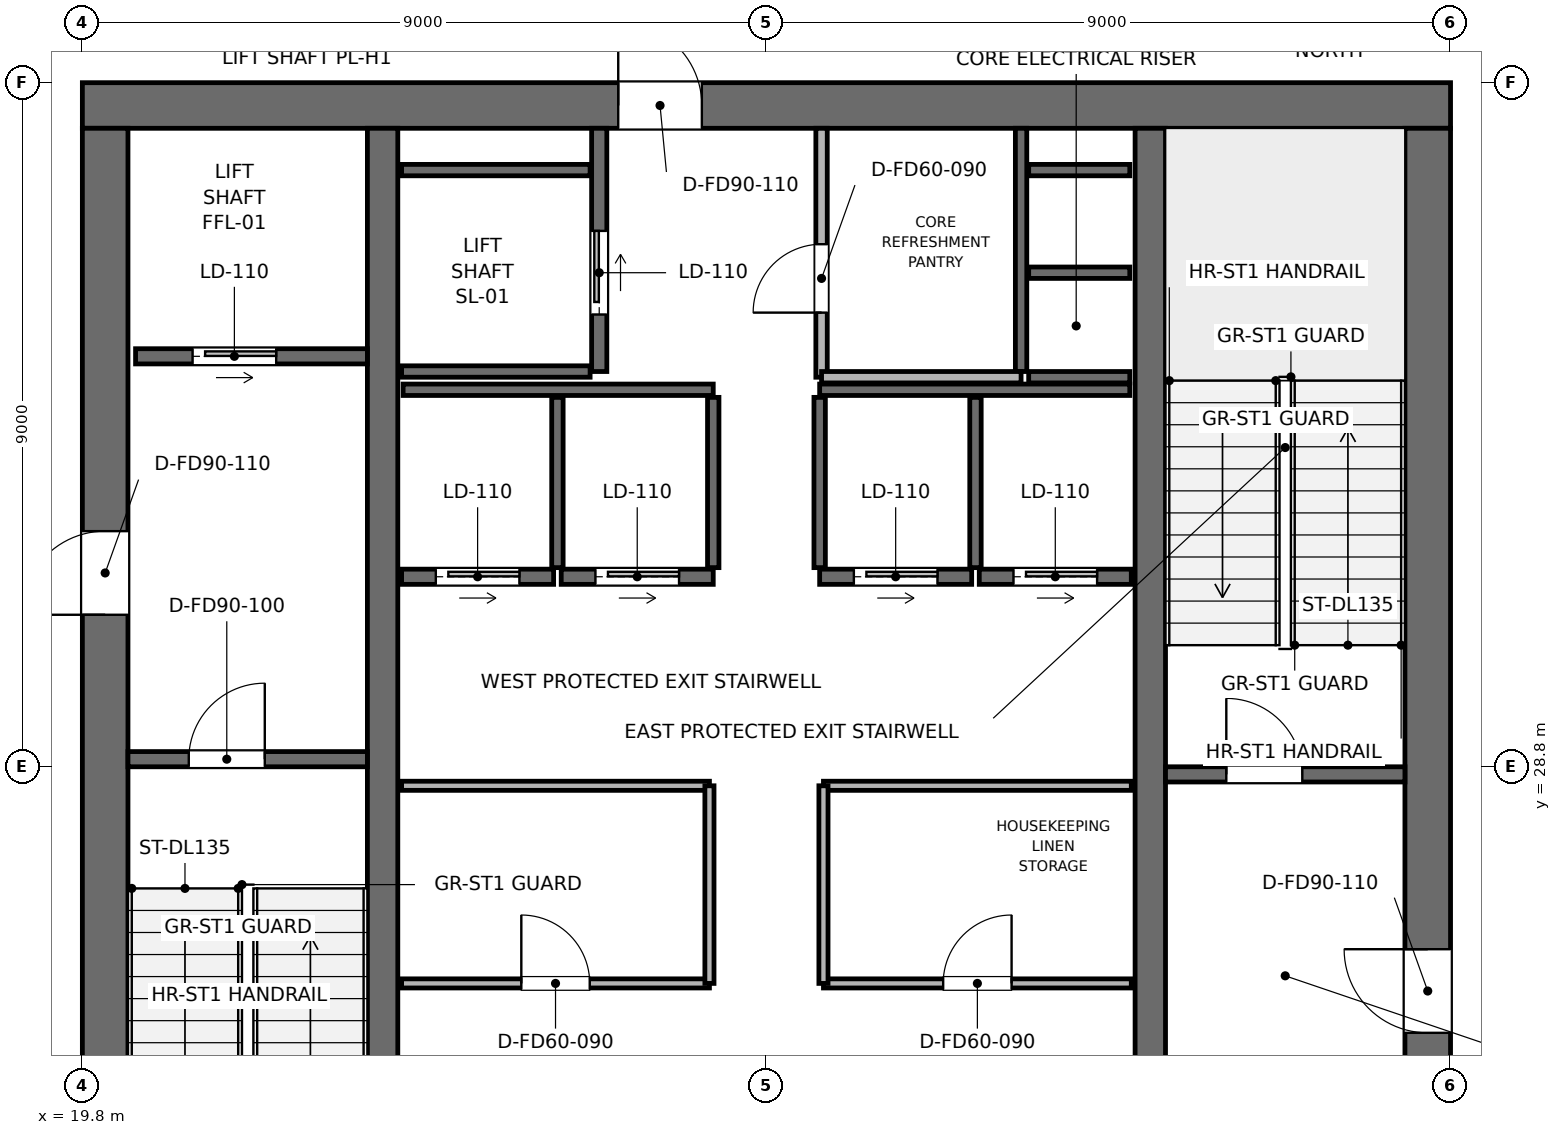
"""IFC4 building model, lengths in metres.
Left out: names, types, materials, properties, quantities, classifications, styles, units other than length and angle.
Written with IfcOpenShell. Run it as: python <this file> out.ifc"""

import sys

from ifc_helpers import new_model, si_unit, direction, frame, frame_2d, origin, place, context, subcontext, project, spatial, rectangle, extrude, element, fill, save


model = new_model("IFC4")
c1 = context("Model", 3, precision=1e-05, world=origin(), true_north=direction((0.0, 1.0)))
c2 = subcontext(c1, "Body", "Model", "MODEL_VIEW")
j1 = project(units=[si_unit("LENGTHUNIT", "METRE"), si_unit("PLANEANGLEUNIT", "RADIAN")], contexts=[c1])
p1 = place(None, origin())
s1 = spatial("IfcSite", under=j1, at=p1, CompositionType="ELEMENT")
p2 = place(p1, origin())
s2 = spatial("IfcBuilding", under=s1, at=p2, CompositionType="ELEMENT")
p3 = place(p2, frame((0.0, 0.0, 355.5)))
s3 = spatial("IfcBuildingStorey", under=s2, at=p3, CompositionType="ELEMENT", Elevation=355.5)
p4 = place(p3, frame((19.8, 37.5, 0.0), z_axis=(0.0, 0.0, 1.0), x_axis=(1.0, 0.0, 0.0)))
e1 = element("IfcWall", 1, at=p4, inside=s3, PredefinedType="SHEAR", context=c2, shape_type="SweptSolid", body=[
    extrude(rectangle(XDim=18.0, YDim=0.6, at=frame_2d((9.0, 0.0))), origin(), (0.0, 0.0, 1.0), 4.5),
])
p5 = place(p4, frame((7.05, 0.0, 0.0)))
e2 = element("IfcOpeningElement", 2, at=p5, cuts=e1, PredefinedType="OPENING", context=c2, shape_type="SweptSolid", body=[
    extrude(rectangle(XDim=1.1, YDim=2.15, at=frame_2d((0.55, 1.075))), frame((0.0, 0.31, 0.0), z_axis=(0.0, -1.0, 0.0), x_axis=(1.0, 0.0, 0.0)), (0.0, 0.0, 1.0), 0.62),
])
p6 = place(p3, frame((20.1, 20.4, 0.0), z_axis=(0.0, 0.0, 1.0), x_axis=(0.0, 1.0, 0.0)))
e3 = element("IfcWall", 3, at=p6, inside=s3, PredefinedType="SHEAR", context=c2, shape_type="SweptSolid", body=[
    extrude(rectangle(XDim=16.8, YDim=0.6, at=frame_2d((8.4, 0.0))), origin(), (0.0, 0.0, 1.0), 4.5),
])
p7 = place(p6, frame((10.4, 0.0, 0.0)))
e4 = element("IfcOpeningElement", 4, at=p7, cuts=e3, PredefinedType="OPENING", context=c2, shape_type="SweptSolid", body=[
    extrude(rectangle(XDim=1.1, YDim=2.15, at=frame_2d((0.55, 1.075))), frame((0.0, 0.31, 0.0), z_axis=(0.0, -1.0, 0.0), x_axis=(1.0, 0.0, 0.0)), (0.0, 0.0, 1.0), 0.62),
])
p8 = place(p3, frame((37.5, 20.4, 0.0), z_axis=(0.0, 0.0, 1.0), x_axis=(0.0, 1.0, 0.0)))
e5 = element("IfcWall", 5, at=p8, inside=s3, PredefinedType="SHEAR", context=c2, shape_type="SweptSolid", body=[
    extrude(rectangle(XDim=16.8, YDim=0.6, at=frame_2d((8.4, 0.0))), origin(), (0.0, 0.0, 1.0), 4.5),
])
p9 = place(p8, frame((4.9, 0.0, 0.0)))
e6 = element("IfcOpeningElement", 6, at=p9, cuts=e5, PredefinedType="OPENING", context=c2, shape_type="SweptSolid", body=[
    extrude(rectangle(XDim=1.1, YDim=2.15, at=frame_2d((0.55, 1.075))), frame((0.0, 0.31, 0.0), z_axis=(0.0, -1.0, 0.0), x_axis=(1.0, 0.0, 0.0)), (0.0, 0.0, 1.0), 0.62),
])
for number, where, z_axis, x_axis in (
    (7, (23.75, 20.4, 0.0), (0.0, 0.0, 1.0), (0.0, 1.0, 0.0)),
    (8, (33.85, 20.4, 0.0), (0.0, 0.0, 1.0), (0.0, 1.0, 0.0)),
):
    element("IfcWall", number, at=place(p3, frame(where, z_axis=z_axis, x_axis=x_axis)), inside=s3, PredefinedType="SHEAR", context=c2, shape_type="SweptSolid", body=[
        extrude(rectangle(XDim=16.8, YDim=0.4, at=frame_2d((8.4, 0.0))), origin(), (0.0, 0.0, 1.0), 4.5),
    ])
p10 = place(p3, frame((20.4, 28.9, 0.0), z_axis=(0.0, 0.0, 1.0), x_axis=(1.0, 0.0, 0.0)))
e9 = element("IfcWall", 9, at=p10, inside=s3, PredefinedType="SHEAR", context=c2, shape_type="SweptSolid", body=[
    extrude(rectangle(XDim=3.15, YDim=0.2, at=frame_2d((1.575, 0.0))), origin(), (0.0, 0.0, 1.0), 4.24),
])
p11 = place(p10, frame((0.8, 0.0, 0.0)))
e10 = element("IfcOpeningElement", 10, at=p11, cuts=e9, PredefinedType="OPENING", context=c2, shape_type="SweptSolid", body=[
    extrude(rectangle(XDim=1.0, YDim=2.1, at=frame_2d((0.5, 1.05))), frame((0.0, 0.11, 0.0), z_axis=(0.0, -1.0, 0.0), x_axis=(1.0, 0.0, 0.0)), (0.0, 0.0, 1.0), 0.22),
])
p12 = place(p3, frame((34.05, 28.7, 0.0), z_axis=(0.0, 0.0, 1.0), x_axis=(1.0, 0.0, 0.0)))
e11 = element("IfcWall", 11, at=p12, inside=s3, PredefinedType="SHEAR", context=c2, shape_type="SweptSolid", body=[
    extrude(rectangle(XDim=3.15, YDim=0.2, at=frame_2d((1.575, 0.0))), origin(), (0.0, 0.0, 1.0), 4.24),
])
p13 = place(p12, frame((0.8, 0.0, 0.0)))
e12 = element("IfcOpeningElement", 12, at=p13, cuts=e11, PredefinedType="OPENING", context=c2, shape_type="SweptSolid", body=[
    extrude(rectangle(XDim=1.0, YDim=2.1, at=frame_2d((0.5, 1.05))), frame((0.0, 0.11, 0.0), z_axis=(0.0, -1.0, 0.0), x_axis=(1.0, 0.0, 0.0)), (0.0, 0.0, 1.0), 0.22),
])
p14 = place(p3, frame((32.15, 34.0, 0.0), z_axis=(0.0, 0.0, 1.0), x_axis=(0.0, 1.0, 0.0)))
e13 = element("IfcWall", 13, at=p14, inside=s3, PredefinedType="SHEAR", context=c2, shape_type="SweptSolid", body=[
    extrude(rectangle(XDim=3.2, YDim=0.15, at=frame_2d((1.6, 0.0))), origin(), (0.0, 0.0, 1.0), 4.24),
])
for number, where, z_axis, x_axis in (
    (14, (32.25, 33.925, 0.0), (0.0, 0.0, 1.0), (1.0, 0.0, 0.0)),
    (15, (32.25, 35.3, 0.0), (0.0, 0.0, 1.0), (1.0, 0.0, 0.0)),
):
    element("IfcWall", number, at=place(p3, frame(where, z_axis=z_axis, x_axis=x_axis)), inside=s3, PredefinedType="SHEAR", context=c2, shape_type="SweptSolid", body=[
        extrude(rectangle(XDim=1.33, YDim=0.15, at=frame_2d((0.665, 0.0))), origin(), (0.0, 0.0, 1.0), 4.24),
    ])
p15 = place(p3, frame((20.5, 34.2, 0.0), z_axis=(0.0, 0.0, 1.0), x_axis=(1.0, 0.0, 0.0)))
e16 = element("IfcWall", 16, at=p15, inside=s3, PredefinedType="SHEAR", context=c2, shape_type="SweptSolid", body=[
    extrude(rectangle(XDim=3.05, YDim=0.2, at=frame_2d((1.525, 0.0))), origin(), (0.0, 0.0, 1.0), 4.24),
])
p16 = place(p15, frame((0.75, 0.0, 0.0)))
e17 = element("IfcOpeningElement", 17, at=p16, cuts=e16, PredefinedType="OPENING", context=c2, shape_type="SweptSolid", body=[
    extrude(rectangle(XDim=1.1, YDim=2.15, at=frame_2d((0.55, 1.075))), frame((0.0, 0.11, 0.0), z_axis=(0.0, -1.0, 0.0), x_axis=(1.0, 0.0, 0.0)), (0.0, 0.0, 1.0), 0.22),
])
p17 = place(p3, frame((26.6, 34.0, 0.0), z_axis=(0.0, 0.0, 1.0), x_axis=(0.0, 1.0, 0.0)))
e18 = element("IfcWall", 18, at=p17, inside=s3, PredefinedType="SHEAR", context=c2, shape_type="SweptSolid", body=[
    extrude(rectangle(XDim=3.2, YDim=0.2, at=frame_2d((1.6, 0.0))), origin(), (0.0, 0.0, 1.0), 4.24),
])
p18 = place(p17, frame((0.75, 0.0, 0.0)))
e19 = element("IfcOpeningElement", 19, at=p18, cuts=e18, PredefinedType="OPENING", context=c2, shape_type="SweptSolid", body=[
    extrude(rectangle(XDim=1.1, YDim=2.15, at=frame_2d((0.55, 1.075))), frame((0.0, 0.11, 0.0), z_axis=(0.0, -1.0, 0.0), x_axis=(1.0, 0.0, 0.0)), (0.0, 0.0, 1.0), 0.22),
])
for number, where, z_axis, x_axis in (
    (20, (24.0, 34.0, 0.0), (0.0, 0.0, 1.0), (1.0, 0.0, 0.0)),
    (21, (24.0, 36.65, 0.0), (0.0, 0.0, 1.0), (1.0, 0.0, 0.0)),
):
    element("IfcWall", number, at=place(p3, frame(where, z_axis=z_axis, x_axis=x_axis)), inside=s3, PredefinedType="SHEAR", context=c2, shape_type="SweptSolid", body=[
        extrude(rectangle(XDim=2.48, YDim=0.15, at=frame_2d((1.24, 0.0))), origin(), (0.0, 0.0, 1.0), 4.24),
    ])
p19 = place(p3, frame((24.0, 31.3, 0.0), z_axis=(0.0, 0.0, 1.0), x_axis=(1.0, 0.0, 0.0)))
e22 = element("IfcWall", 22, at=p19, inside=s3, PredefinedType="SHEAR", context=c2, shape_type="SweptSolid", body=[
    extrude(rectangle(XDim=2.0, YDim=0.2, at=frame_2d((1.0, 0.0))), origin(), (0.0, 0.0, 1.0), 4.24),
])
p20 = place(p19, frame((0.45, 0.0, 0.0)))
e23 = element("IfcOpeningElement", 23, at=p20, cuts=e22, PredefinedType="OPENING", context=c2, shape_type="SweptSolid", body=[
    extrude(rectangle(XDim=1.1, YDim=2.15, at=frame_2d((0.55, 1.075))), frame((0.0, 0.11, 0.0), z_axis=(0.0, -1.0, 0.0), x_axis=(1.0, 0.0, 0.0)), (0.0, 0.0, 1.0), 0.22),
])
p21 = place(p3, frame((26.1, 31.3, 0.0), z_axis=(0.0, 0.0, 1.0), x_axis=(1.0, 0.0, 0.0)))
e24 = element("IfcWall", 24, at=p21, inside=s3, PredefinedType="SHEAR", context=c2, shape_type="SweptSolid", body=[
    extrude(rectangle(XDim=2.0, YDim=0.2, at=frame_2d((1.0, 0.0))), origin(), (0.0, 0.0, 1.0), 4.24),
])
p22 = place(p21, frame((0.45, 0.0, 0.0)))
e25 = element("IfcOpeningElement", 25, at=p22, cuts=e24, PredefinedType="OPENING", context=c2, shape_type="SweptSolid", body=[
    extrude(rectangle(XDim=1.1, YDim=2.15, at=frame_2d((0.55, 1.075))), frame((0.0, 0.11, 0.0), z_axis=(0.0, -1.0, 0.0), x_axis=(1.0, 0.0, 0.0)), (0.0, 0.0, 1.0), 0.22),
])
p23 = place(p3, frame((29.5, 31.3, 0.0), z_axis=(0.0, 0.0, 1.0), x_axis=(1.0, 0.0, 0.0)))
e26 = element("IfcWall", 26, at=p23, inside=s3, PredefinedType="SHEAR", context=c2, shape_type="SweptSolid", body=[
    extrude(rectangle(XDim=2.0, YDim=0.2, at=frame_2d((1.0, 0.0))), origin(), (0.0, 0.0, 1.0), 4.24),
])
p24 = place(p23, frame((0.45, 0.0, 0.0)))
e27 = element("IfcOpeningElement", 27, at=p24, cuts=e26, PredefinedType="OPENING", context=c2, shape_type="SweptSolid", body=[
    extrude(rectangle(XDim=1.1, YDim=2.15, at=frame_2d((0.55, 1.075))), frame((0.0, 0.11, 0.0), z_axis=(0.0, -1.0, 0.0), x_axis=(1.0, 0.0, 0.0)), (0.0, 0.0, 1.0), 0.22),
])
p25 = place(p3, frame((31.6, 31.3, 0.0), z_axis=(0.0, 0.0, 1.0), x_axis=(1.0, 0.0, 0.0)))
e28 = element("IfcWall", 28, at=p25, inside=s3, PredefinedType="SHEAR", context=c2, shape_type="SweptSolid", body=[
    extrude(rectangle(XDim=2.0, YDim=0.2, at=frame_2d((1.0, 0.0))), origin(), (0.0, 0.0, 1.0), 4.24),
])
p26 = place(p25, frame((0.45, 0.0, 0.0)))
e29 = element("IfcOpeningElement", 29, at=p26, cuts=e28, PredefinedType="OPENING", context=c2, shape_type="SweptSolid", body=[
    extrude(rectangle(XDim=1.1, YDim=2.15, at=frame_2d((0.55, 1.075))), frame((0.0, 0.11, 0.0), z_axis=(0.0, -1.0, 0.0), x_axis=(1.0, 0.0, 0.0)), (0.0, 0.0, 1.0), 0.22),
])
p27 = place(p3, frame((32.25, 36.65, 0.0), z_axis=(0.0, 0.0, 1.0), x_axis=(1.0, 0.0, 0.0)))
e30 = element("IfcWall", 30, at=p27, inside=s3, PredefinedType="SHEAR", context=c2, shape_type="SweptSolid", body=[
    extrude(rectangle(XDim=1.33, YDim=0.15, at=frame_2d((0.665, 0.0))), origin(), (0.0, 0.0, 1.0), 4.24),
])
for number, where, z_axis, x_axis in (
    (31, (24.02, 33.76, 0.0), (0.0, 0.0, 1.0), (1.0, 0.0, 0.0)),
    (32, (29.5, 33.76, 0.0), (0.0, 0.0, 1.0), (1.0, 0.0, 0.0)),
):
    element("IfcWall", number, at=place(p3, frame(where, z_axis=z_axis, x_axis=x_axis)), inside=s3, PredefinedType="SHEAR", context=c2, shape_type="SweptSolid", body=[
        extrude(rectangle(XDim=4.08, YDim=0.15, at=frame_2d((2.04, 0.0))), origin(), (0.0, 0.0, 1.0), 4.24),
    ])
for number, where, z_axis, x_axis in (
    (33, (26.05, 31.42, 0.0), (0.0, 0.0, 1.0), (0.0, 1.0, 0.0)),
    (34, (28.1, 31.42, 0.0), (0.0, 0.0, 1.0), (0.0, 1.0, 0.0)),
    (35, (29.5, 31.42, 0.0), (0.0, 0.0, 1.0), (0.0, 1.0, 0.0)),
    (36, (31.55, 31.42, 0.0), (0.0, 0.0, 1.0), (0.0, 1.0, 0.0)),
):
    element("IfcWall", number, at=place(p3, frame(where, z_axis=z_axis, x_axis=x_axis)), inside=s3, PredefinedType="SHEAR", context=c2, shape_type="SweptSolid", body=[
        extrude(rectangle(XDim=2.24, YDim=0.15, at=frame_2d((1.12, 0.0))), origin(), (0.0, 0.0, 1.0), 4.24),
    ])
p28 = place(p3, frame((29.525, 33.925, 0.0), z_axis=(0.0, 0.0, 1.0), x_axis=(0.0, 1.0, 0.0)))
e37 = element("IfcWall", 37, at=p28, inside=s3, PredefinedType="PARTITIONING", context=c2, shape_type="SweptSolid", body=[
    extrude(rectangle(XDim=3.275, YDim=0.15, at=frame_2d((1.637, 0.0))), origin(), (0.0, 0.0, 1.0), 4.24),
])
p29 = place(p28, frame((0.85, 0.0, 0.0)))
e38 = element("IfcOpeningElement", 38, at=p29, cuts=e37, PredefinedType="OPENING", context=c2, shape_type="SweptSolid", body=[
    extrude(rectangle(XDim=0.9, YDim=2.1, at=frame_2d((0.45, 1.05))), frame((0.0, 0.085, 0.0), z_axis=(0.0, -1.0, 0.0), x_axis=(1.0, 0.0, 0.0)), (0.0, 0.0, 1.0), 0.17),
])
p30 = place(p3, frame((29.525, 33.925, 0.0), z_axis=(0.0, 0.0, 1.0), x_axis=(1.0, 0.0, 0.0)))
e39 = element("IfcWall", 39, at=p30, inside=s3, PredefinedType="PARTITIONING", context=c2, shape_type="SweptSolid", body=[
    extrude(rectangle(XDim=2.625, YDim=0.15, at=frame_2d((1.312, 0.0))), origin(), (0.0, 0.0, 1.0), 4.24),
])
p31 = place(p3, frame((24.0, 25.95, 0.0), z_axis=(0.0, 0.0, 1.0), x_axis=(1.0, 0.0, 0.0)))
e40 = element("IfcWall", 40, at=p31, inside=s3, PredefinedType="PARTITIONING", context=c2, shape_type="SweptSolid", body=[
    extrude(rectangle(XDim=4.05, YDim=0.12, at=frame_2d((2.025, 0.0))), origin(), (0.0, 0.0, 1.0), 4.24),
])
p32 = place(p31, frame((1.575, 0.0, 0.0)))
e41 = element("IfcOpeningElement", 41, at=p32, cuts=e40, PredefinedType="OPENING", context=c2, shape_type="SweptSolid", body=[
    extrude(rectangle(XDim=0.9, YDim=2.1, at=frame_2d((0.45, 1.05))), frame((0.0, 0.07, 0.0), z_axis=(0.0, -1.0, 0.0), x_axis=(1.0, 0.0, 0.0)), (0.0, 0.0, 1.0), 0.14),
])
p33 = place(p3, frame((24.0, 28.55, 0.0), z_axis=(0.0, 0.0, 1.0), x_axis=(1.0, 0.0, 0.0)))
e42 = element("IfcWall", 42, at=p33, inside=s3, PredefinedType="PARTITIONING", context=c2, shape_type="SweptSolid", body=[
    extrude(rectangle(XDim=4.05, YDim=0.12, at=frame_2d((2.025, 0.0))), origin(), (0.0, 0.0, 1.0), 4.24),
])
p34 = place(p3, frame((28.05, 25.95, 0.0), z_axis=(0.0, 0.0, 1.0), x_axis=(0.0, 1.0, 0.0)))
e43 = element("IfcWall", 43, at=p34, inside=s3, PredefinedType="PARTITIONING", context=c2, shape_type="SweptSolid", body=[
    extrude(rectangle(XDim=2.6, YDim=0.12, at=frame_2d((1.3, 0.0))), origin(), (0.0, 0.0, 1.0), 4.24),
])
p35 = place(p3, frame((29.55, 25.95, 0.0), z_axis=(0.0, 0.0, 1.0), x_axis=(1.0, 0.0, 0.0)))
e44 = element("IfcWall", 44, at=p35, inside=s3, PredefinedType="PARTITIONING", context=c2, shape_type="SweptSolid", body=[
    extrude(rectangle(XDim=4.05, YDim=0.12, at=frame_2d((2.025, 0.0))), origin(), (0.0, 0.0, 1.0), 4.24),
])
p36 = place(p35, frame((1.575, 0.0, 0.0)))
e45 = element("IfcOpeningElement", 45, at=p36, cuts=e44, PredefinedType="OPENING", context=c2, shape_type="SweptSolid", body=[
    extrude(rectangle(XDim=0.9, YDim=2.1, at=frame_2d((0.45, 1.05))), frame((0.0, 0.07, 0.0), z_axis=(0.0, -1.0, 0.0), x_axis=(1.0, 0.0, 0.0)), (0.0, 0.0, 1.0), 0.14),
])
p37 = place(p3, frame((29.55, 28.55, 0.0), z_axis=(0.0, 0.0, 1.0), x_axis=(1.0, 0.0, 0.0)))
e46 = element("IfcWall", 46, at=p37, inside=s3, PredefinedType="PARTITIONING", context=c2, shape_type="SweptSolid", body=[
    extrude(rectangle(XDim=4.05, YDim=0.12, at=frame_2d((2.025, 0.0))), origin(), (0.0, 0.0, 1.0), 4.24),
])
p38 = place(p3, frame((29.55, 25.95, 0.0), z_axis=(0.0, 0.0, 1.0), x_axis=(0.0, 1.0, 0.0)))
e47 = element("IfcWall", 47, at=p38, inside=s3, PredefinedType="PARTITIONING", context=c2, shape_type="SweptSolid", body=[
    extrude(rectangle(XDim=2.6, YDim=0.12, at=frame_2d((1.3, 0.0))), origin(), (0.0, 0.0, 1.0), 4.24),
])
p39 = place(p11, origin())
e48 = element("IfcDoor", 48, at=p39, inside=s3, OperationType="SINGLE_SWING_RIGHT", PredefinedType="DOOR", context=c2, shape_type="SweptSolid", body=[
    extrude(rectangle(XDim=1.0, YDim=2.1, at=frame_2d((0.5, 1.05))), frame((0.0, 0.025, 0.0), z_axis=(0.0, -1.0, 0.0), x_axis=(1.0, 0.0, 0.0)), (0.0, 0.0, 1.0), 0.05),
])
fill(e10, e48)
p40 = place(p13, origin())
e49 = element("IfcDoor", 49, at=p40, inside=s3, OperationType="SINGLE_SWING_LEFT", PredefinedType="DOOR", context=c2, shape_type="SweptSolid", body=[
    extrude(rectangle(XDim=1.0, YDim=2.1, at=frame_2d((0.5, 1.05))), frame((0.0, 0.025, 0.0), z_axis=(0.0, -1.0, 0.0), x_axis=(1.0, 0.0, 0.0)), (0.0, 0.0, 1.0), 0.05),
])
fill(e12, e49)
p41 = place(p16, origin())
e50 = element("IfcDoor", 50, at=p41, inside=s3, OperationType="SLIDING_TO_RIGHT", PredefinedType="DOOR", context=c2, shape_type="SweptSolid", body=[
    extrude(rectangle(XDim=1.1, YDim=2.15, at=frame_2d((0.55, 1.075))), frame((0.0, 0.025, 0.0), z_axis=(0.0, -1.0, 0.0), x_axis=(1.0, 0.0, 0.0)), (0.0, 0.0, 1.0), 0.05),
])
fill(e17, e50)
p42 = place(p18, origin())
e51 = element("IfcDoor", 51, at=p42, inside=s3, OperationType="SLIDING_TO_RIGHT", PredefinedType="DOOR", context=c2, shape_type="SweptSolid", body=[
    extrude(rectangle(XDim=1.1, YDim=2.15, at=frame_2d((0.55, 1.075))), frame((0.0, 0.025, 0.0), z_axis=(0.0, -1.0, 0.0), x_axis=(1.0, 0.0, 0.0)), (0.0, 0.0, 1.0), 0.05),
])
fill(e19, e51)
p43 = place(p20, origin())
e52 = element("IfcDoor", 52, at=p43, inside=s3, OperationType="SLIDING_TO_RIGHT", PredefinedType="DOOR", context=c2, shape_type="SweptSolid", body=[
    extrude(rectangle(XDim=1.1, YDim=2.15, at=frame_2d((0.55, 1.075))), frame((0.0, 0.025, 0.0), z_axis=(0.0, -1.0, 0.0), x_axis=(1.0, 0.0, 0.0)), (0.0, 0.0, 1.0), 0.05),
])
fill(e23, e52)
p44 = place(p22, origin())
e53 = element("IfcDoor", 53, at=p44, inside=s3, OperationType="SLIDING_TO_RIGHT", PredefinedType="DOOR", context=c2, shape_type="SweptSolid", body=[
    extrude(rectangle(XDim=1.1, YDim=2.15, at=frame_2d((0.55, 1.075))), frame((0.0, 0.025, 0.0), z_axis=(0.0, -1.0, 0.0), x_axis=(1.0, 0.0, 0.0)), (0.0, 0.0, 1.0), 0.05),
])
fill(e25, e53)
p45 = place(p24, origin())
e54 = element("IfcDoor", 54, at=p45, inside=s3, OperationType="SLIDING_TO_RIGHT", PredefinedType="DOOR", context=c2, shape_type="SweptSolid", body=[
    extrude(rectangle(XDim=1.1, YDim=2.15, at=frame_2d((0.55, 1.075))), frame((0.0, 0.025, 0.0), z_axis=(0.0, -1.0, 0.0), x_axis=(1.0, 0.0, 0.0)), (0.0, 0.0, 1.0), 0.05),
])
fill(e27, e54)
p46 = place(p26, origin())
e55 = element("IfcDoor", 55, at=p46, inside=s3, OperationType="SLIDING_TO_RIGHT", PredefinedType="DOOR", context=c2, shape_type="SweptSolid", body=[
    extrude(rectangle(XDim=1.1, YDim=2.15, at=frame_2d((0.55, 1.075))), frame((0.0, 0.025, 0.0), z_axis=(0.0, -1.0, 0.0), x_axis=(1.0, 0.0, 0.0)), (0.0, 0.0, 1.0), 0.05),
])
fill(e29, e55)
p47 = place(p29, origin())
e56 = element("IfcDoor", 56, at=p47, inside=s3, OperationType="SINGLE_SWING_LEFT", PredefinedType="DOOR", context=c2, shape_type="SweptSolid", body=[
    extrude(rectangle(XDim=0.9, YDim=2.1, at=frame_2d((0.45, 1.05))), frame((0.0, 0.025, 0.0), z_axis=(0.0, -1.0, 0.0), x_axis=(1.0, 0.0, 0.0)), (0.0, 0.0, 1.0), 0.05),
])
fill(e38, e56)
p48 = place(p32, origin())
e57 = element("IfcDoor", 57, at=p48, inside=s3, OperationType="SINGLE_SWING_LEFT", PredefinedType="DOOR", context=c2, shape_type="SweptSolid", body=[
    extrude(rectangle(XDim=0.9, YDim=2.1, at=frame_2d((0.45, 1.05))), frame((0.0, 0.025, 0.0), z_axis=(0.0, -1.0, 0.0), x_axis=(1.0, 0.0, 0.0)), (0.0, 0.0, 1.0), 0.05),
])
fill(e41, e57)
p49 = place(p36, origin())
e58 = element("IfcDoor", 58, at=p49, inside=s3, OperationType="SINGLE_SWING_RIGHT", PredefinedType="DOOR", context=c2, shape_type="SweptSolid", body=[
    extrude(rectangle(XDim=0.9, YDim=2.1, at=frame_2d((0.45, 1.05))), frame((0.0, 0.025, 0.0), z_axis=(0.0, -1.0, 0.0), x_axis=(1.0, 0.0, 0.0)), (0.0, 0.0, 1.0), 0.05),
])
fill(e45, e58)
p50 = place(p7, origin())
e59 = element("IfcDoor", 59, at=p50, inside=s3, OperationType="SINGLE_SWING_LEFT", PredefinedType="DOOR", context=c2, shape_type="SweptSolid", body=[
    extrude(rectangle(XDim=1.1, YDim=2.15, at=frame_2d((0.55, 1.075))), frame((0.0, 0.025, 0.0), z_axis=(0.0, -1.0, 0.0), x_axis=(1.0, 0.0, 0.0)), (0.0, 0.0, 1.0), 0.05),
])
fill(e4, e59)
p51 = place(p9, origin())
e60 = element("IfcDoor", 60, at=p51, inside=s3, OperationType="SINGLE_SWING_RIGHT", PredefinedType="DOOR", context=c2, shape_type="SweptSolid", body=[
    extrude(rectangle(XDim=1.1, YDim=2.15, at=frame_2d((0.55, 1.075))), frame((0.0, 0.025, 0.0), z_axis=(0.0, -1.0, 0.0), x_axis=(1.0, 0.0, 0.0)), (0.0, 0.0, 1.0), 0.05),
])
fill(e6, e60)
p52 = place(p5, origin())
e61 = element("IfcDoor", 61, at=p52, inside=s3, OperationType="SINGLE_SWING_LEFT", PredefinedType="DOOR", context=c2, shape_type="SweptSolid", body=[
    extrude(rectangle(XDim=1.1, YDim=2.15, at=frame_2d((0.55, 1.075))), frame((0.0, 0.025, 0.0), z_axis=(0.0, -1.0, 0.0), x_axis=(1.0, 0.0, 0.0)), (0.0, 0.0, 1.0), 0.05),
])
fill(e2, e61)
save(model, sys.argv[1])
